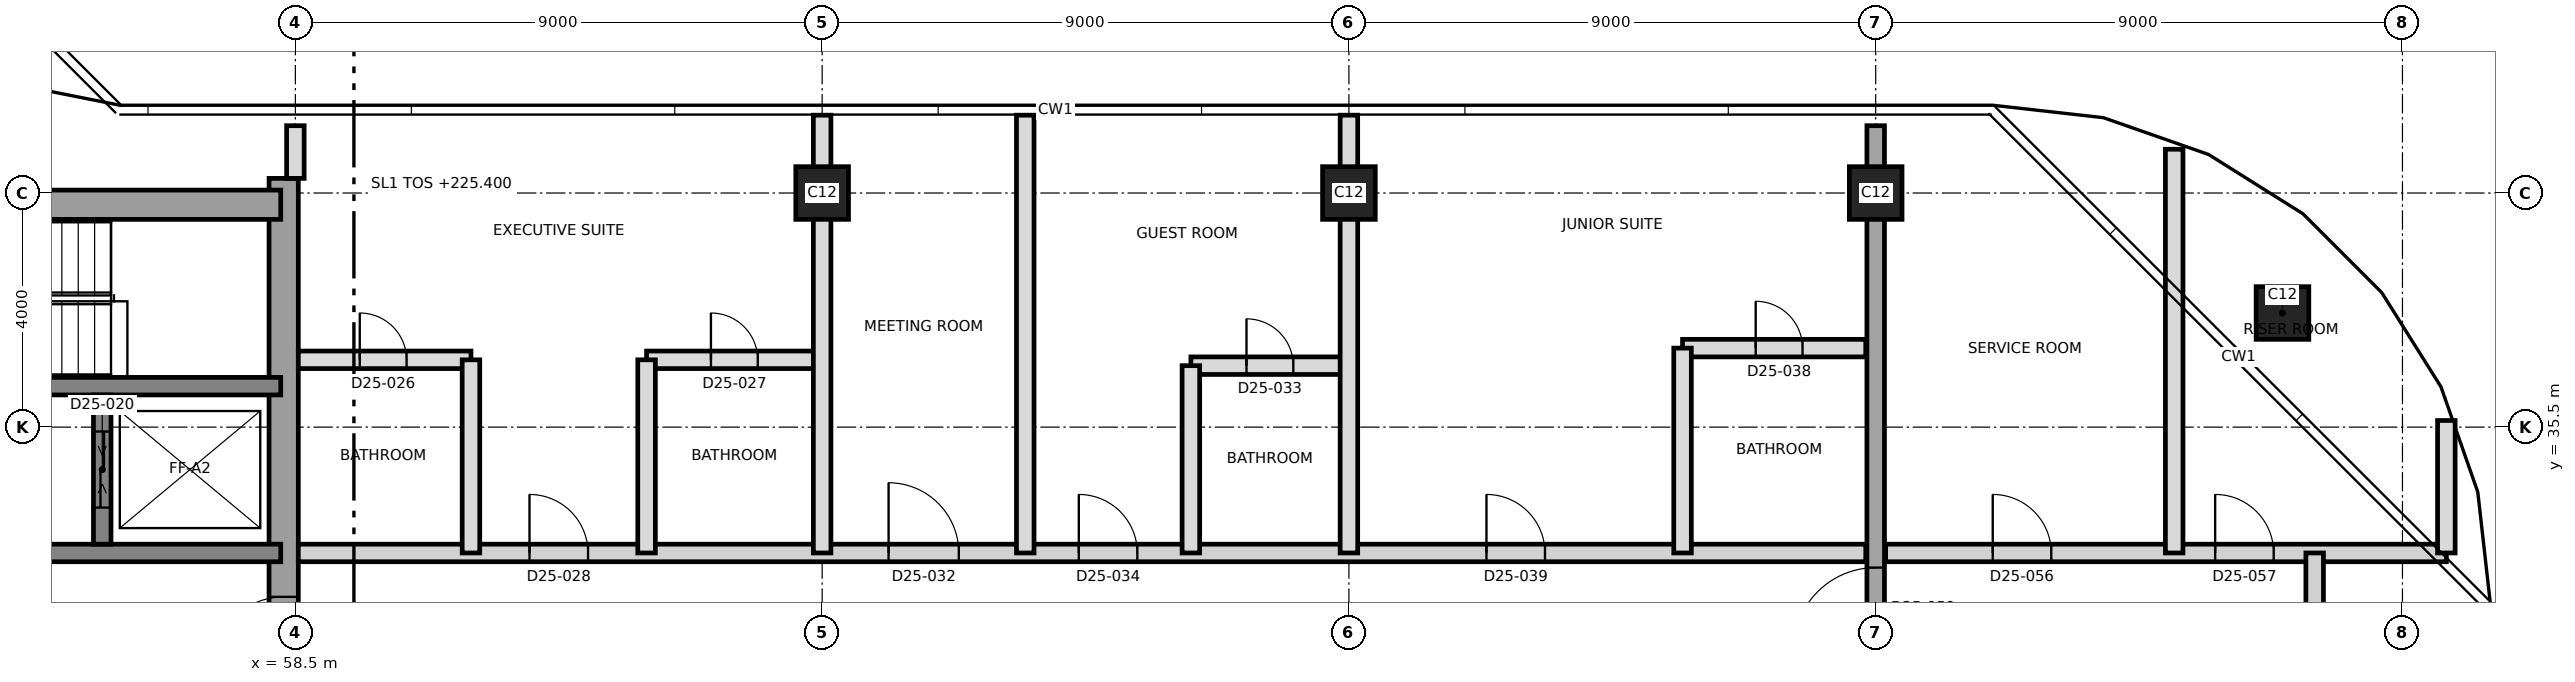
"""IFC4 building model, lengths in metres.
Left out: names, types, materials, properties, quantities, classifications, styles, units other than length and angle.
Written with IfcOpenShell. Run it as: python <this file> out.ifc"""

import sys

from ifc_helpers import new_model, si_unit, direction, frame, frame_2d, origin, origin_2d, place, context, subcontext, project, spatial, rectangle, extrude, element, fill, save


model = new_model("IFC4")
c1 = context("Model", 3, precision=1e-05, world=origin(), true_north=direction((0.0, 1.0)))
c2 = subcontext(c1, "Body", "Model", "MODEL_VIEW")
j1 = project(units=[si_unit("LENGTHUNIT", "METRE"), si_unit("PLANEANGLEUNIT", "RADIAN")], contexts=[c1])
p1 = place(None, origin())
s1 = spatial("IfcSite", under=j1, at=p1, CompositionType="ELEMENT")
p2 = place(p1, origin())
s2 = spatial("IfcBuilding", under=s1, at=p2, CompositionType="ELEMENT")
p3 = place(p2, frame((0.0, 0.0, 225.4)))
s3 = spatial("IfcBuildingStorey", under=s2, at=p3, CompositionType="ELEMENT", Elevation=225.4)
p4 = place(p3, frame((58.3, 21.25, 0.0), z_axis=(0.0, 0.0, 1.0), x_axis=(0.0, 1.0, 0.0)))
e1 = element("IfcWall", 1, at=p4, inside=s3, PredefinedType="SHEAR", context=c2, shape_type="SweptSolid", body=[
    extrude(rectangle(XDim=18.5, YDim=0.5, at=frame_2d((9.25, 0.0))), origin(), (0.0, 0.0, 1.0), 3.7),
])
p5 = place(p4, frame((10.15, 0.0, 0.0)))
e2 = element("IfcOpeningElement", 2, at=p5, cuts=e1, PredefinedType="OPENING", context=c2, shape_type="SweptSolid", body=[
    extrude(rectangle(XDim=1.2, YDim=2.1, at=frame_2d((0.6, 1.05))), frame((0.0, 0.26, 0.0), z_axis=(0.0, -1.0, 0.0), x_axis=(1.0, 0.0, 0.0)), (0.0, 0.0, 1.0), 0.52),
])
p6 = place(p3, frame((31.25, 39.3, 0.0), z_axis=(0.0, 0.0, 1.0), x_axis=(1.0, 0.0, 0.0)))
e3 = element("IfcWall", 3, at=p6, inside=s3, PredefinedType="SHEAR", context=c2, shape_type="SweptSolid", body=[
    extrude(rectangle(XDim=27.0, YDim=0.5, at=frame_2d((13.5, 0.0))), origin(), (0.0, 0.0, 1.0), 3.7),
])
p7 = place(p6, frame((10.45, 0.0, 0.0)))
e4 = element("IfcOpeningElement", 4, at=p7, cuts=e3, PredefinedType="OPENING", context=c2, shape_type="SweptSolid", body=[
    extrude(rectangle(XDim=1.2, YDim=2.1, at=frame_2d((0.6, 1.05))), frame((0.0, 0.26, 0.0), z_axis=(0.0, -1.0, 0.0), x_axis=(1.0, 0.0, 0.0)), (0.0, 0.0, 1.0), 0.52),
])
p8 = place(p3, frame((31.75, 33.35, 0.0), z_axis=(0.0, 0.0, 1.0), x_axis=(1.0, 0.0, 0.0)))
e5 = element("IfcWall", 5, at=p8, inside=s3, PredefinedType="SHEAR", context=c2, shape_type="SweptSolid", body=[
    extrude(rectangle(XDim=26.5, YDim=0.3, at=frame_2d((13.25, 0.0))), origin(), (0.0, 0.0, 1.0), 3.7),
])
p9 = place(p8, frame((13.9, 0.0, 0.0)))
e6 = element("IfcOpeningElement", 6, at=p9, cuts=e5, PredefinedType="OPENING", context=c2, shape_type="SweptSolid", body=[
    extrude(rectangle(XDim=1.4, YDim=2.1, at=frame_2d((0.7, 1.05))), frame((0.0, 0.16, 0.0), z_axis=(0.0, -1.0, 0.0), x_axis=(1.0, 0.0, 0.0)), (0.0, 0.0, 1.0), 0.32),
])
p10 = place(p8, frame((5.375, 0.0, 0.0)))
e7 = element("IfcOpeningElement", 7, at=p10, cuts=e5, PredefinedType="OPENING", context=c2, shape_type="SweptSolid", body=[
    extrude(rectangle(XDim=1.2, YDim=2.1, at=frame_2d((0.6, 1.05))), frame((0.0, 0.16, 0.0), z_axis=(0.0, -1.0, 0.0), x_axis=(1.0, 0.0, 0.0)), (0.0, 0.0, 1.0), 0.32),
])
p11 = place(p8, frame((19.925, 0.0, 0.0)))
e8 = element("IfcOpeningElement", 8, at=p11, cuts=e5, PredefinedType="OPENING", context=c2, shape_type="SweptSolid", body=[
    extrude(rectangle(XDim=1.2, YDim=2.1, at=frame_2d((0.6, 1.05))), frame((0.0, 0.16, 0.0), z_axis=(0.0, -1.0, 0.0), x_axis=(1.0, 0.0, 0.0)), (0.0, 0.0, 1.0), 0.32),
])
p12 = place(p3, frame((43.5, 36.2, 0.0), z_axis=(0.0, 0.0, 1.0), x_axis=(1.0, 0.0, 0.0)))
e9 = element("IfcWall", 9, at=p12, inside=s3, PredefinedType="SHEAR", context=c2, shape_type="SweptSolid", body=[
    extrude(rectangle(XDim=14.75, YDim=0.3, at=frame_2d((7.375, 0.0))), origin(), (0.0, 0.0, 1.0), 3.7),
])
p13 = place(p12, frame((6.9, 0.0, 0.0)))
e10 = element("IfcOpeningElement", 10, at=p13, cuts=e9, PredefinedType="OPENING", context=c2, shape_type="SweptSolid", body=[
    extrude(rectangle(XDim=1.2, YDim=2.1, at=frame_2d((0.6, 1.05))), frame((0.0, 0.16, 0.0), z_axis=(0.0, -1.0, 0.0), x_axis=(1.0, 0.0, 0.0)), (0.0, 0.0, 1.0), 0.32),
])
p14 = place(p12, frame((0.7, 0.0, 0.0)))
e11 = element("IfcOpeningElement", 11, at=p14, cuts=e9, PredefinedType="OPENING", context=c2, shape_type="SweptSolid", body=[
    extrude(rectangle(XDim=1.3, YDim=2.4, at=frame_2d((0.65, 1.2))), frame((0.0, 0.16, 0.0), z_axis=(0.0, -1.0, 0.0), x_axis=(1.0, 0.0, 0.0)), (0.0, 0.0, 1.0), 0.32),
])
p15 = place(p12, frame((3.7, 0.0, 0.0)))
e12 = element("IfcOpeningElement", 12, at=p15, cuts=e9, PredefinedType="OPENING", context=c2, shape_type="SweptSolid", body=[
    extrude(rectangle(XDim=1.3, YDim=2.4, at=frame_2d((0.65, 1.2))), frame((0.0, 0.16, 0.0), z_axis=(0.0, -1.0, 0.0), x_axis=(1.0, 0.0, 0.0)), (0.0, 0.0, 1.0), 0.32),
])
p16 = place(p3, frame((55.2, 33.5, 0.0), z_axis=(0.0, 0.0, 1.0), x_axis=(0.0, 1.0, 0.0)))
e13 = element("IfcWall", 13, at=p16, inside=s3, PredefinedType="SHEAR", context=c2, shape_type="SweptSolid", body=[
    extrude(rectangle(XDim=2.55, YDim=0.3, at=frame_2d((1.275, 0.0))), origin(), (0.0, 0.0, 1.0), 3.7),
])
p17 = place(p16, frame((0.625, 0.0, 0.0)))
e14 = element("IfcOpeningElement", 14, at=p17, cuts=e13, PredefinedType="OPENING", context=c2, shape_type="SweptSolid", body=[
    extrude(rectangle(XDim=1.3, YDim=2.4, at=frame_2d((0.65, 1.2))), frame((0.0, 0.16, 0.0), z_axis=(0.0, -1.0, 0.0), x_axis=(1.0, 0.0, 0.0)), (0.0, 0.0, 1.0), 0.32),
])
for number, where, z_axis, x_axis in (
    (15, (92.45, 37.45, 0.0), (0.0, 0.0, 1.0), (1.0, 0.0, 0.0)),
    (16, (67.5, 39.5, 0.0), (0.0, 0.0, 1.0), (1.0, 0.0, 0.0)),
    (17, (76.5, 39.5, 0.0), (0.0, 0.0, 1.0), (1.0, 0.0, 0.0)),
    (18, (85.5, 39.5, 0.0), (0.0, 0.0, 1.0), (1.0, 0.0, 0.0)),
):
    element("IfcColumn", number, at=place(p3, frame(where, z_axis=z_axis, x_axis=x_axis)), inside=s3, PredefinedType="COLUMN", context=c2, shape_type="SweptSolid", body=[
        extrude(rectangle(XDim=0.9, YDim=0.9, at=origin_2d()), origin(), (0.0, 0.0, 1.0), 3.7),
    ])
p18 = place(p3, frame((85.5, 20.35, 0.0), z_axis=(0.0, 0.0, 1.0), x_axis=(0.0, 1.0, 0.0)))
e19 = element("IfcWall", 19, at=p18, inside=s3, PredefinedType="SHEAR", context=c2, shape_type="SweptSolid", body=[
    extrude(rectangle(XDim=20.3, YDim=0.3, at=frame_2d((10.15, 0.0))), origin(), (0.0, 0.0, 1.0), 3.7),
])
p19 = place(p18, frame((11.35, 0.0, 0.0)))
e20 = element("IfcOpeningElement", 20, at=p19, cuts=e19, PredefinedType="OPENING", context=c2, shape_type="SweptSolid", body=[
    extrude(rectangle(XDim=1.4, YDim=2.1, at=frame_2d((0.7, 1.05))), frame((0.0, 0.16, 0.0), z_axis=(0.0, -1.0, 0.0), x_axis=(1.0, 0.0, 0.0)), (0.0, 0.0, 1.0), 0.32),
])
p20 = place(p3, frame((58.55, 33.35, 0.0), z_axis=(0.0, 0.0, 1.0), x_axis=(1.0, 0.0, 0.0)))
e21 = element("IfcWall", 21, at=p20, inside=s3, PredefinedType="PARTITIONING", context=c2, shape_type="SweptSolid", body=[
    extrude(rectangle(XDim=26.78, YDim=0.3, at=frame_2d((13.39, 0.0))), origin(), (0.0, 0.0, 1.0), 3.4),
])
p21 = place(p20, frame((3.95, 0.0, 0.0)))
e22 = element("IfcOpeningElement", 22, at=p21, cuts=e21, PredefinedType="OPENING", context=c2, shape_type="SweptSolid", body=[
    extrude(rectangle(XDim=1.0, YDim=2.4, at=frame_2d((0.5, 1.2))), frame((0.0, 0.16, 0.0), z_axis=(0.0, -1.0, 0.0), x_axis=(1.0, 0.0, 0.0)), (0.0, 0.0, 1.0), 0.32),
])
p22 = place(p20, frame((10.085, 0.0, 0.0)))
e23 = element("IfcOpeningElement", 23, at=p22, cuts=e21, PredefinedType="OPENING", context=c2, shape_type="SweptSolid", body=[
    extrude(rectangle(XDim=1.2, YDim=2.1, at=frame_2d((0.6, 1.05))), frame((0.0, 0.16, 0.0), z_axis=(0.0, -1.0, 0.0), x_axis=(1.0, 0.0, 0.0)), (0.0, 0.0, 1.0), 0.32),
])
p23 = place(p20, frame((13.335, 0.0, 0.0)))
e24 = element("IfcOpeningElement", 24, at=p23, cuts=e21, PredefinedType="OPENING", context=c2, shape_type="SweptSolid", body=[
    extrude(rectangle(XDim=1.0, YDim=2.1, at=frame_2d((0.5, 1.05))), frame((0.0, 0.16, 0.0), z_axis=(0.0, -1.0, 0.0), x_axis=(1.0, 0.0, 0.0)), (0.0, 0.0, 1.0), 0.32),
])
p24 = place(p20, frame((20.3, 0.0, 0.0)))
e25 = element("IfcOpeningElement", 25, at=p24, cuts=e21, PredefinedType="OPENING", context=c2, shape_type="SweptSolid", body=[
    extrude(rectangle(XDim=1.0, YDim=2.4, at=frame_2d((0.5, 1.2))), frame((0.0, 0.16, 0.0), z_axis=(0.0, -1.0, 0.0), x_axis=(1.0, 0.0, 0.0)), (0.0, 0.0, 1.0), 0.32),
])
p25 = place(p3, frame((85.67, 33.35, 0.0), z_axis=(0.0, 0.0, 1.0), x_axis=(1.0, 0.0, 0.0)))
e26 = element("IfcWall", 26, at=p25, inside=s3, PredefinedType="PARTITIONING", context=c2, shape_type="SweptSolid", body=[
    extrude(rectangle(XDim=9.58, YDim=0.3, at=frame_2d((4.79, 0.0))), origin(), (0.0, 0.0, 1.0), 3.4),
])
p26 = place(p25, frame((1.83, 0.0, 0.0)))
e27 = element("IfcOpeningElement", 27, at=p26, cuts=e26, PredefinedType="OPENING", context=c2, shape_type="SweptSolid", body=[
    extrude(rectangle(XDim=1.0, YDim=2.1, at=frame_2d((0.5, 1.05))), frame((0.0, 0.16, 0.0), z_axis=(0.0, -1.0, 0.0), x_axis=(1.0, 0.0, 0.0)), (0.0, 0.0, 1.0), 0.32),
])
p27 = place(p25, frame((5.63, 0.0, 0.0)))
e28 = element("IfcOpeningElement", 28, at=p27, cuts=e26, PredefinedType="OPENING", context=c2, shape_type="SweptSolid", body=[
    extrude(rectangle(XDim=1.0, YDim=2.1, at=frame_2d((0.5, 1.05))), frame((0.0, 0.16, 0.0), z_axis=(0.0, -1.0, 0.0), x_axis=(1.0, 0.0, 0.0)), (0.0, 0.0, 1.0), 0.32),
])
p28 = place(p3, frame((73.8, 36.55, 0.0), z_axis=(0.0, 0.0, 1.0), x_axis=(1.0, 0.0, 0.0)))
e29 = element("IfcWall", 29, at=p28, inside=s3, PredefinedType="PARTITIONING", context=c2, shape_type="SweptSolid", body=[
    extrude(rectangle(XDim=2.7, YDim=0.3, at=frame_2d((1.35, 0.0))), origin(), (0.0, 0.0, 1.0), 3.4),
])
p29 = place(p28, frame((0.95, 0.0, 0.0)))
e30 = element("IfcOpeningElement", 30, at=p29, cuts=e29, PredefinedType="OPENING", context=c2, shape_type="SweptSolid", body=[
    extrude(rectangle(XDim=0.8, YDim=2.1, at=frame_2d((0.4, 1.05))), frame((0.0, 0.16, 0.0), z_axis=(0.0, -1.0, 0.0), x_axis=(1.0, 0.0, 0.0)), (0.0, 0.0, 1.0), 0.32),
])
p30 = place(p3, frame((58.55, 36.65, 0.0), z_axis=(0.0, 0.0, 1.0), x_axis=(1.0, 0.0, 0.0)))
e31 = element("IfcWall", 31, at=p30, inside=s3, PredefinedType="PARTITIONING", context=c2, shape_type="SweptSolid", body=[
    extrude(rectangle(XDim=2.95, YDim=0.3, at=frame_2d((1.475, 0.0))), origin(), (0.0, 0.0, 1.0), 3.4),
])
p31 = place(p30, frame((1.05, 0.0, 0.0)))
e32 = element("IfcOpeningElement", 32, at=p31, cuts=e31, PredefinedType="OPENING", context=c2, shape_type="SweptSolid", body=[
    extrude(rectangle(XDim=0.8, YDim=2.1, at=frame_2d((0.4, 1.05))), frame((0.0, 0.16, 0.0), z_axis=(0.0, -1.0, 0.0), x_axis=(1.0, 0.0, 0.0)), (0.0, 0.0, 1.0), 0.32),
])
p32 = place(p3, frame((64.5, 36.65, 0.0), z_axis=(0.0, 0.0, 1.0), x_axis=(1.0, 0.0, 0.0)))
e33 = element("IfcWall", 33, at=p32, inside=s3, PredefinedType="PARTITIONING", context=c2, shape_type="SweptSolid", body=[
    extrude(rectangle(XDim=3.0, YDim=0.3, at=frame_2d((1.5, 0.0))), origin(), (0.0, 0.0, 1.0), 3.4),
])
p33 = place(p32, frame((1.1, 0.0, 0.0)))
e34 = element("IfcOpeningElement", 34, at=p33, cuts=e33, PredefinedType="OPENING", context=c2, shape_type="SweptSolid", body=[
    extrude(rectangle(XDim=0.8, YDim=2.1, at=frame_2d((0.4, 1.05))), frame((0.0, 0.16, 0.0), z_axis=(0.0, -1.0, 0.0), x_axis=(1.0, 0.0, 0.0)), (0.0, 0.0, 1.0), 0.32),
])
p34 = place(p3, frame((82.2, 36.85, 0.0), z_axis=(0.0, 0.0, 1.0), x_axis=(1.0, 0.0, 0.0)))
e35 = element("IfcWall", 35, at=p34, inside=s3, PredefinedType="PARTITIONING", context=c2, shape_type="SweptSolid", body=[
    extrude(rectangle(XDim=3.13, YDim=0.3, at=frame_2d((1.565, 0.0))), origin(), (0.0, 0.0, 1.0), 3.4),
])
p35 = place(p34, frame((1.25, 0.0, 0.0)))
e36 = element("IfcOpeningElement", 36, at=p35, cuts=e35, PredefinedType="OPENING", context=c2, shape_type="SweptSolid", body=[
    extrude(rectangle(XDim=0.8, YDim=2.1, at=frame_2d((0.4, 1.05))), frame((0.0, 0.16, 0.0), z_axis=(0.0, -1.0, 0.0), x_axis=(1.0, 0.0, 0.0)), (0.0, 0.0, 1.0), 0.32),
])
p36 = place(p3, frame((58.5, 39.75, 0.0), z_axis=(0.0, 0.0, 1.0), x_axis=(0.0, 1.0, 0.0)))
e37 = element("IfcWall", 37, at=p36, inside=s3, PredefinedType="PARTITIONING", context=c2, shape_type="SweptSolid", body=[
    extrude(rectangle(XDim=0.9, YDim=0.3, at=frame_2d((0.45, 0.0))), origin(), (0.0, 0.0, 1.0), 3.4),
])
for number, where, z_axis, x_axis in (
    (38, (61.5, 33.35, 0.0), (0.0, 0.0, 1.0), (0.0, 1.0, 0.0)),
    (39, (64.5, 33.35, 0.0), (0.0, 0.0, 1.0), (0.0, 1.0, 0.0)),
):
    element("IfcWall", number, at=place(p3, frame(where, z_axis=z_axis, x_axis=x_axis)), inside=s3, PredefinedType="PARTITIONING", context=c2, shape_type="SweptSolid", body=[
        extrude(rectangle(XDim=3.3, YDim=0.3, at=frame_2d((1.65, 0.0))), origin(), (0.0, 0.0, 1.0), 3.4),
    ])
for number, where, z_axis, x_axis in (
    (40, (67.5, 33.35, 0.0), (0.0, 0.0, 1.0), (0.0, 1.0, 0.0)),
    (41, (70.97, 33.35, 0.0), (0.0, 0.0, 1.0), (0.0, 1.0, 0.0)),
):
    element("IfcWall", number, at=place(p3, frame(where, z_axis=z_axis, x_axis=x_axis)), inside=s3, PredefinedType="PARTITIONING", context=c2, shape_type="SweptSolid", body=[
        extrude(rectangle(XDim=7.48, YDim=0.3, at=frame_2d((3.74, 0.0))), origin(), (0.0, 0.0, 1.0), 3.4),
    ])
p37 = place(p3, frame((73.8, 33.35, 0.0), z_axis=(0.0, 0.0, 1.0), x_axis=(0.0, 1.0, 0.0)))
e42 = element("IfcWall", 42, at=p37, inside=s3, PredefinedType="PARTITIONING", context=c2, shape_type="SweptSolid", body=[
    extrude(rectangle(XDim=3.2, YDim=0.3, at=frame_2d((1.6, 0.0))), origin(), (0.0, 0.0, 1.0), 3.4),
])
p38 = place(p3, frame((76.5, 33.35, 0.0), z_axis=(0.0, 0.0, 1.0), x_axis=(0.0, 1.0, 0.0)))
e43 = element("IfcWall", 43, at=p38, inside=s3, PredefinedType="PARTITIONING", context=c2, shape_type="SweptSolid", body=[
    extrude(rectangle(XDim=7.48, YDim=0.3, at=frame_2d((3.74, 0.0))), origin(), (0.0, 0.0, 1.0), 3.4),
])
p39 = place(p3, frame((82.2, 33.35, 0.0), z_axis=(0.0, 0.0, 1.0), x_axis=(0.0, 1.0, 0.0)))
e44 = element("IfcWall", 44, at=p39, inside=s3, PredefinedType="PARTITIONING", context=c2, shape_type="SweptSolid", body=[
    extrude(rectangle(XDim=3.5, YDim=0.3, at=frame_2d((1.75, 0.0))), origin(), (0.0, 0.0, 1.0), 3.4),
])
p40 = place(p3, frame((90.6, 33.35, 0.0), z_axis=(0.0, 0.0, 1.0), x_axis=(0.0, 1.0, 0.0)))
e45 = element("IfcWall", 45, at=p40, inside=s3, PredefinedType="PARTITIONING", context=c2, shape_type="SweptSolid", body=[
    extrude(rectangle(XDim=6.898, YDim=0.3, at=frame_2d((3.449, 0.0))), origin(), (0.0, 0.0, 1.0), 3.4),
])
p41 = place(p3, frame((93.0, 30.65, 0.0), z_axis=(0.0, 0.0, 1.0), x_axis=(0.0, 1.0, 0.0)))
e46 = element("IfcWall", 46, at=p41, inside=s3, PredefinedType="PARTITIONING", context=c2, shape_type="SweptSolid", body=[
    extrude(rectangle(XDim=2.7, YDim=0.3, at=frame_2d((1.35, 0.0))), origin(), (0.0, 0.0, 1.0), 3.4),
])
p42 = place(p3, frame((95.25, 33.35, 0.0), z_axis=(0.0, 0.0, 1.0), x_axis=(0.0, 1.0, 0.0)))
e47 = element("IfcWall", 47, at=p42, inside=s3, PredefinedType="PARTITIONING", context=c2, shape_type="SweptSolid", body=[
    extrude(rectangle(XDim=2.263, YDim=0.3, at=frame_2d((1.131, 0.0))), origin(), (0.0, 0.0, 1.0), 3.4),
])
p43 = place(p5, origin())
e48 = element("IfcDoor", 48, at=p43, inside=s3, OperationType="SINGLE_SWING_LEFT", PredefinedType="DOOR", context=c2, shape_type="SweptSolid", body=[
    extrude(rectangle(XDim=1.2, YDim=2.1, at=frame_2d((0.6, 1.05))), frame((0.0, 0.025, 0.0), z_axis=(0.0, -1.0, 0.0), x_axis=(1.0, 0.0, 0.0)), (0.0, 0.0, 1.0), 0.05),
])
fill(e2, e48)
p44 = place(p17, origin())
e49 = element("IfcDoor", 49, at=p44, inside=s3, OperationType="SLIDING_TO_LEFT", PredefinedType="DOOR", context=c2, shape_type="SweptSolid", body=[
    extrude(rectangle(XDim=1.3, YDim=2.4, at=frame_2d((0.65, 1.2))), frame((0.0, 0.025, 0.0), z_axis=(0.0, -1.0, 0.0), x_axis=(1.0, 0.0, 0.0)), (0.0, 0.0, 1.0), 0.05),
])
fill(e14, e49)
p45 = place(p31, origin())
e50 = element("IfcDoor", 50, at=p45, inside=s3, OperationType="SINGLE_SWING_LEFT", PredefinedType="DOOR", context=c2, shape_type="SweptSolid", body=[
    extrude(rectangle(XDim=0.8, YDim=2.1, at=frame_2d((0.4, 1.05))), frame((0.0, 0.025, 0.0), z_axis=(0.0, -1.0, 0.0), x_axis=(1.0, 0.0, 0.0)), (0.0, 0.0, 1.0), 0.05),
])
fill(e32, e50)
p46 = place(p33, origin())
e51 = element("IfcDoor", 51, at=p46, inside=s3, OperationType="SINGLE_SWING_RIGHT", PredefinedType="DOOR", context=c2, shape_type="SweptSolid", body=[
    extrude(rectangle(XDim=0.8, YDim=2.1, at=frame_2d((0.4, 1.05))), frame((0.0, 0.025, 0.0), z_axis=(0.0, -1.0, 0.0), x_axis=(1.0, 0.0, 0.0)), (0.0, 0.0, 1.0), 0.05),
])
fill(e34, e51)
p47 = place(p21, origin())
e52 = element("IfcDoor", 52, at=p47, inside=s3, OperationType="SINGLE_SWING_LEFT", PredefinedType="DOOR", context=c2, shape_type="SweptSolid", body=[
    extrude(rectangle(XDim=1.0, YDim=2.4, at=frame_2d((0.5, 1.2))), frame((0.0, 0.025, 0.0), z_axis=(0.0, -1.0, 0.0), x_axis=(1.0, 0.0, 0.0)), (0.0, 0.0, 1.0), 0.05),
])
fill(e22, e52)
p48 = place(p22, origin())
e53 = element("IfcDoor", 53, at=p48, inside=s3, OperationType="SINGLE_SWING_LEFT", PredefinedType="DOOR", context=c2, shape_type="SweptSolid", body=[
    extrude(rectangle(XDim=1.2, YDim=2.1, at=frame_2d((0.6, 1.05))), frame((0.0, 0.025, 0.0), z_axis=(0.0, -1.0, 0.0), x_axis=(1.0, 0.0, 0.0)), (0.0, 0.0, 1.0), 0.05),
])
fill(e23, e53)
p49 = place(p29, origin())
e54 = element("IfcDoor", 54, at=p49, inside=s3, OperationType="SINGLE_SWING_RIGHT", PredefinedType="DOOR", context=c2, shape_type="SweptSolid", body=[
    extrude(rectangle(XDim=0.8, YDim=2.1, at=frame_2d((0.4, 1.05))), frame((0.0, 0.025, 0.0), z_axis=(0.0, -1.0, 0.0), x_axis=(1.0, 0.0, 0.0)), (0.0, 0.0, 1.0), 0.05),
])
fill(e30, e54)
p50 = place(p23, origin())
e55 = element("IfcDoor", 55, at=p50, inside=s3, OperationType="SINGLE_SWING_LEFT", PredefinedType="DOOR", context=c2, shape_type="SweptSolid", body=[
    extrude(rectangle(XDim=1.0, YDim=2.1, at=frame_2d((0.5, 1.05))), frame((0.0, 0.025, 0.0), z_axis=(0.0, -1.0, 0.0), x_axis=(1.0, 0.0, 0.0)), (0.0, 0.0, 1.0), 0.05),
])
fill(e24, e55)
p51 = place(p35, origin())
e56 = element("IfcDoor", 56, at=p51, inside=s3, OperationType="SINGLE_SWING_LEFT", PredefinedType="DOOR", context=c2, shape_type="SweptSolid", body=[
    extrude(rectangle(XDim=0.8, YDim=2.1, at=frame_2d((0.4, 1.05))), frame((0.0, 0.025, 0.0), z_axis=(0.0, -1.0, 0.0), x_axis=(1.0, 0.0, 0.0)), (0.0, 0.0, 1.0), 0.05),
])
fill(e36, e56)
p52 = place(p24, origin())
e57 = element("IfcDoor", 57, at=p52, inside=s3, OperationType="SINGLE_SWING_LEFT", PredefinedType="DOOR", context=c2, shape_type="SweptSolid", body=[
    extrude(rectangle(XDim=1.0, YDim=2.4, at=frame_2d((0.5, 1.2))), frame((0.0, 0.025, 0.0), z_axis=(0.0, -1.0, 0.0), x_axis=(1.0, 0.0, 0.0)), (0.0, 0.0, 1.0), 0.05),
])
fill(e25, e57)
p53 = place(p26, origin())
e58 = element("IfcDoor", 58, at=p53, inside=s3, OperationType="SINGLE_SWING_LEFT", PredefinedType="DOOR", context=c2, shape_type="SweptSolid", body=[
    extrude(rectangle(XDim=1.0, YDim=2.1, at=frame_2d((0.5, 1.05))), frame((0.0, 0.025, 0.0), z_axis=(0.0, -1.0, 0.0), x_axis=(1.0, 0.0, 0.0)), (0.0, 0.0, 1.0), 0.05),
])
fill(e27, e58)
p54 = place(p27, origin())
e59 = element("IfcDoor", 59, at=p54, inside=s3, OperationType="SINGLE_SWING_RIGHT", PredefinedType="DOOR", context=c2, shape_type="SweptSolid", body=[
    extrude(rectangle(XDim=1.0, YDim=2.1, at=frame_2d((0.5, 1.05))), frame((0.0, 0.025, 0.0), z_axis=(0.0, -1.0, 0.0), x_axis=(1.0, 0.0, 0.0)), (0.0, 0.0, 1.0), 0.05),
])
fill(e28, e59)
p55 = place(p19, origin())
e60 = element("IfcDoor", 60, at=p55, inside=s3, OperationType="SINGLE_SWING_RIGHT", PredefinedType="DOOR", context=c2, shape_type="SweptSolid", body=[
    extrude(rectangle(XDim=1.4, YDim=2.1, at=frame_2d((0.7, 1.05))), frame((0.0, 0.025, 0.0), z_axis=(0.0, -1.0, 0.0), x_axis=(1.0, 0.0, 0.0)), (0.0, 0.0, 1.0), 0.05),
])
fill(e20, e60)
save(model, sys.argv[1])
